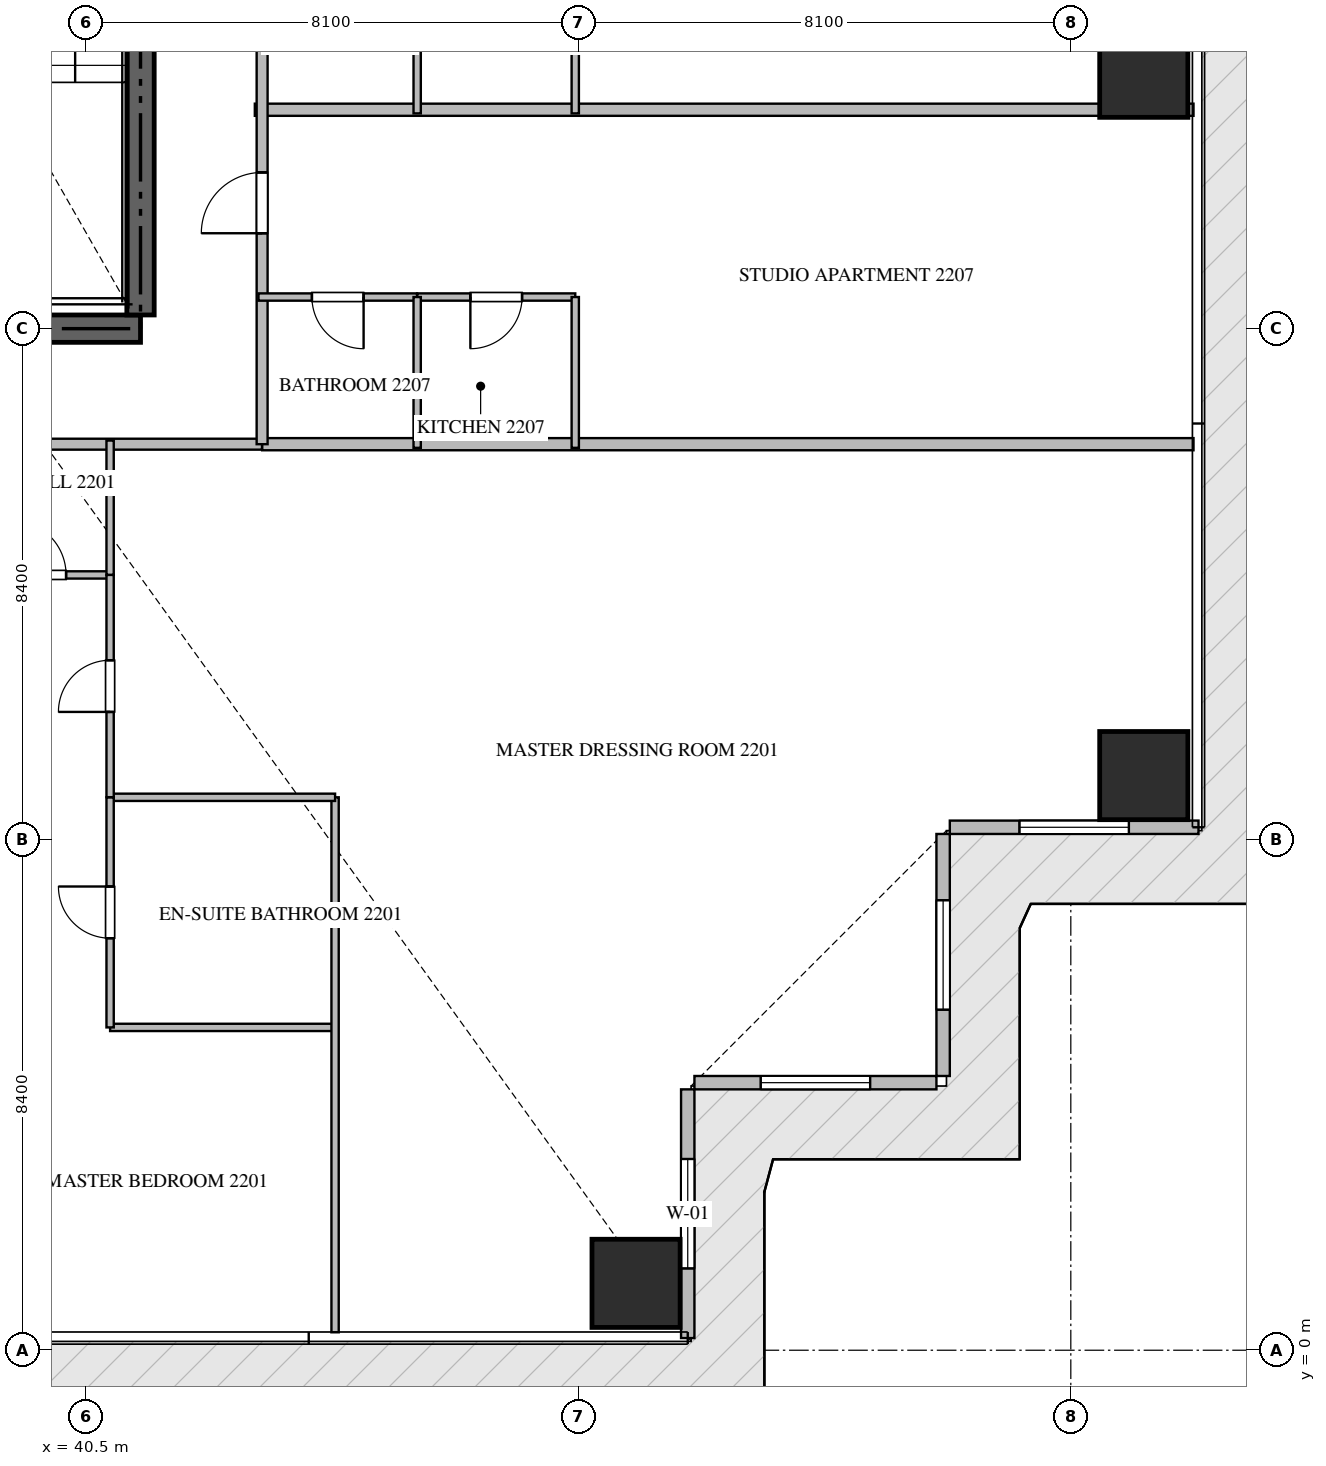
"""IFC4 building model, lengths in metres.
Left out: names, types, materials, properties, quantities, classifications, styles, units other than length and angle.
Written with IfcOpenShell. Run it as: python <this file> out.ifc"""

import sys

from ifc_helpers import new_model, si_unit, direction, frame, frame_2d, origin, origin_2d, place, context, subcontext, project, spatial, rectangle, extrude, source, transform, mapped, element, fill, save


model = new_model("IFC4")
c1 = context("Model", 3, precision=1e-05, world=origin(), true_north=direction((0.0, 1.0)))
c2 = subcontext(c1, "Body", "Model", "MODEL_VIEW")
j1 = project(units=[si_unit("LENGTHUNIT", "METRE"), si_unit("PLANEANGLEUNIT", "RADIAN")], contexts=[c1])
p1 = place(None, origin())
s1 = spatial("IfcSite", under=j1, at=p1, CompositionType="ELEMENT")
p2 = place(p1, origin())
s2 = spatial("IfcBuilding", under=s1, at=p2, CompositionType="ELEMENT")
p3 = place(p2, frame((0.0, 0.0, 90.45)))
s3 = spatial("IfcBuildingStorey", under=s2, at=p3, CompositionType="ELEMENT", Elevation=90.45)
p4 = place(p3, frame((23.4, 16.8, -0.26), z_axis=(0.0, 0.0, 1.0), x_axis=(1.0, 0.0, 0.0)))
e1 = element("IfcWall", 1, at=p4, inside=s3, PredefinedType="SHEAR", context=c2, shape_type="SweptSolid", body=[
    extrude(rectangle(XDim=18.0, YDim=0.45, at=frame_2d((9.0, 0.0))), origin(), (0.0, 0.0, 1.0), 3.748),
])
p5 = place(p3, frame((41.4, 17.025, -0.26), z_axis=(0.0, 0.0, 1.0), x_axis=(0.0, 1.0, 0.0)))
e2 = element("IfcWall", 2, at=p5, inside=s3, PredefinedType="SHEAR", context=c2, shape_type="SweptSolid", body=[
    extrude(rectangle(XDim=8.325, YDim=0.45, at=frame_2d((4.163, 0.0))), origin(), (0.0, 0.0, 1.0), 3.748),
])
m1 = source(origin(), c2, "Body", "SweptSolid", [
    extrude(rectangle(XDim=1.45, YDim=1.45, at=origin_2d()), origin(), (0.0, 0.0, 1.0), 3.75),
])
for number, where, z_axis, x_axis in (
    (3, (49.55, 1.1, -0.26), (0.0, 0.0, 1.0), (1.0, 0.0, 0.0)),
    (4, (57.9, 9.45, -0.26), (0.0, 0.0, 1.0), (1.0, 0.0, 0.0)),
    (5, (57.9, 21.0, -0.26), (0.0, 0.0, 1.0), (1.0, 0.0, 0.0)),
):
    element("IfcColumn", number, at=place(p3, frame(where, z_axis=z_axis, x_axis=x_axis)), inside=s3, PredefinedType="COLUMN", context=c2, shape_type="MappedRepresentation", body=[
        mapped(m1, transform((0.0, 0.0, 0.0), scale=1.0)),
    ])
p6 = place(p3, frame((50.4, 0.2, 0.0), z_axis=(0.0, 0.0, 1.0), x_axis=(0.0, 1.0, 0.0)))
e6 = element("IfcWall", 6, at=p6, inside=s3, PredefinedType="ELEMENTEDWALL", context=c2, shape_type="SweptSolid", body=[
    extrude(rectangle(XDim=4.09, YDim=0.22, at=frame_2d((2.045, 0.0))), origin(), (0.0, 0.0, 1.0), 3.475),
])
p7 = place(p6, frame((1.145, 0.0, 0.65)))
e7 = element("IfcOpeningElement", 7, at=p7, cuts=e6, PredefinedType="OPENING", context=c2, shape_type="SweptSolid", body=[
    extrude(rectangle(XDim=1.8, YDim=2.1, at=frame_2d((0.9, 1.05))), frame((0.0, 0.12, 0.0), z_axis=(0.0, -1.0, 0.0), x_axis=(1.0, 0.0, 0.0)), (0.0, 0.0, 1.0), 0.24),
])
p8 = place(p3, frame((50.51, 4.4, 0.0), z_axis=(0.0, 0.0, 1.0), x_axis=(1.0, 0.0, 0.0)))
e8 = element("IfcWall", 8, at=p8, inside=s3, PredefinedType="ELEMENTEDWALL", context=c2, shape_type="SweptSolid", body=[
    extrude(rectangle(XDim=3.98, YDim=0.22, at=frame_2d((1.99, 0.0))), origin(), (0.0, 0.0, 1.0), 3.475),
])
p9 = place(p8, frame((1.09, 0.0, 0.65)))
e9 = element("IfcOpeningElement", 9, at=p9, cuts=e8, PredefinedType="OPENING", context=c2, shape_type="SweptSolid", body=[
    extrude(rectangle(XDim=1.8, YDim=2.1, at=frame_2d((0.9, 1.05))), frame((0.0, 0.12, 0.0), z_axis=(0.0, -1.0, 0.0), x_axis=(1.0, 0.0, 0.0)), (0.0, 0.0, 1.0), 0.24),
])
p10 = place(p3, frame((54.6, 4.51, 0.0), z_axis=(0.0, 0.0, 1.0), x_axis=(0.0, 1.0, 0.0)))
e10 = element("IfcWall", 10, at=p10, inside=s3, PredefinedType="ELEMENTEDWALL", context=c2, shape_type="SweptSolid", body=[
    extrude(rectangle(XDim=3.98, YDim=0.22, at=frame_2d((1.99, 0.0))), origin(), (0.0, 0.0, 1.0), 3.475),
])
p11 = place(p10, frame((1.09, 0.0, 0.65)))
e11 = element("IfcOpeningElement", 11, at=p11, cuts=e10, PredefinedType="OPENING", context=c2, shape_type="SweptSolid", body=[
    extrude(rectangle(XDim=1.8, YDim=2.1, at=frame_2d((0.9, 1.05))), frame((0.0, 0.12, 0.0), z_axis=(0.0, -1.0, 0.0), x_axis=(1.0, 0.0, 0.0)), (0.0, 0.0, 1.0), 0.24),
])
p12 = place(p3, frame((54.71, 8.6, 0.0), z_axis=(0.0, 0.0, 1.0), x_axis=(1.0, 0.0, 0.0)))
e12 = element("IfcWall", 12, at=p12, inside=s3, PredefinedType="ELEMENTEDWALL", context=c2, shape_type="SweptSolid", body=[
    extrude(rectangle(XDim=4.09, YDim=0.22, at=frame_2d((2.045, 0.0))), origin(), (0.0, 0.0, 1.0), 3.475),
])
p13 = place(p12, frame((1.145, 0.0, 0.65)))
e13 = element("IfcOpeningElement", 13, at=p13, cuts=e12, PredefinedType="OPENING", context=c2, shape_type="SweptSolid", body=[
    extrude(rectangle(XDim=1.8, YDim=2.1, at=frame_2d((0.9, 1.05))), frame((0.0, 0.12, 0.0), z_axis=(0.0, -1.0, 0.0), x_axis=(1.0, 0.0, 0.0)), (0.0, 0.0, 1.0), 0.24),
])
p14 = place(p3, frame((43.28, 20.4, 0.0), z_axis=(0.0, 0.0, 1.0), x_axis=(1.0, 0.0, 0.0)))
e14 = element("IfcWall", 14, at=p14, inside=s3, PredefinedType="PARTITIONING", context=c2, shape_type="SweptSolid", body=[
    extrude(rectangle(XDim=15.438, YDim=0.2, at=frame_2d((7.719, 0.0))), origin(), (0.0, 0.0, 1.0), 3.49),
])
p15 = place(p3, frame((43.4, 14.9, 0.0), z_axis=(0.0, 0.0, 1.0), x_axis=(1.0, 0.0, 0.0)))
e15 = element("IfcWall", 15, at=p15, inside=s3, PredefinedType="PARTITIONING", context=c2, shape_type="SweptSolid", body=[
    extrude(rectangle(XDim=15.318, YDim=0.2, at=frame_2d((7.659, 0.0))), origin(), (0.0, 0.0, 1.0), 3.49),
])
p16 = place(p3, frame((21.402, 14.9, 0.0), z_axis=(0.0, 0.0, 1.0), x_axis=(1.0, 0.0, 0.0)))
e16 = element("IfcWall", 16, at=p16, inside=s3, PredefinedType="PARTITIONING", context=c2, shape_type="SweptSolid", body=[
    extrude(rectangle(XDim=21.996, YDim=0.18, at=frame_2d((10.998, 0.0))), origin(), (0.0, 0.0, 1.0), 3.49),
])
p17 = place(p16, frame((7.202, 0.0, 0.0)))
e17 = element("IfcOpeningElement", 17, at=p17, cuts=e16, PredefinedType="OPENING", context=c2, shape_type="SweptSolid", body=[
    extrude(rectangle(XDim=1.0, YDim=2.15, at=frame_2d((0.5, 1.075))), frame((0.0, 0.1, 0.0), z_axis=(0.0, -1.0, 0.0), x_axis=(1.0, 0.0, 0.0)), (0.0, 0.0, 1.0), 0.2),
])
p18 = place(p3, frame((43.4, 14.9, 0.0), z_axis=(0.0, 0.0, 1.0), x_axis=(0.0, 1.0, 0.0)))
e18 = element("IfcWall", 18, at=p18, inside=s3, PredefinedType="PARTITIONING", context=c2, shape_type="SweptSolid", body=[
    extrude(rectangle(XDim=20.6, YDim=0.18, at=frame_2d((10.3, 0.0))), origin(), (0.0, 0.0, 1.0), 3.49),
])
p19 = place(p18, frame((3.469, 0.0, 0.0)))
e19 = element("IfcOpeningElement", 19, at=p19, cuts=e18, PredefinedType="OPENING", context=c2, shape_type="SweptSolid", body=[
    extrude(rectangle(XDim=1.0, YDim=2.15, at=frame_2d((0.5, 1.075))), frame((0.0, 0.1, 0.0), z_axis=(0.0, -1.0, 0.0), x_axis=(1.0, 0.0, 0.0)), (0.0, 0.0, 1.0), 0.2),
])
p20 = place(p18, frame((11.074, 0.0, 0.0)))
e20 = element("IfcOpeningElement", 20, at=p20, cuts=e18, PredefinedType="OPENING", context=c2, shape_type="SweptSolid", body=[
    extrude(rectangle(XDim=1.0, YDim=2.15, at=frame_2d((0.5, 1.075))), frame((0.0, 0.1, 0.0), z_axis=(0.0, -1.0, 0.0), x_axis=(1.0, 0.0, 0.0)), (0.0, 0.0, 1.0), 0.2),
])
p21 = place(p18, frame((17.78, 0.0, 0.0)))
e21 = element("IfcOpeningElement", 21, at=p21, cuts=e18, PredefinedType="OPENING", context=c2, shape_type="SweptSolid", body=[
    extrude(rectangle(XDim=1.0, YDim=2.15, at=frame_2d((0.5, 1.075))), frame((0.0, 0.1, 0.0), z_axis=(0.0, -1.0, 0.0), x_axis=(1.0, 0.0, 0.0)), (0.0, 0.0, 1.0), 0.2),
])
p22 = place(p3, frame((38.552, 12.75, 0.0), z_axis=(0.0, 0.0, 1.0), x_axis=(1.0, 0.0, 0.0)))
e22 = element("IfcWall", 22, at=p22, inside=s3, PredefinedType="PARTITIONING", context=c2, shape_type="SweptSolid", body=[
    extrude(rectangle(XDim=2.348, YDim=0.12, at=frame_2d((1.174, 0.0))), origin(), (0.0, 0.0, 1.0), 3.49),
])
p23 = place(p22, frame((0.724, 0.0, 0.0)))
e23 = element("IfcOpeningElement", 23, at=p23, cuts=e22, PredefinedType="OPENING", context=c2, shape_type="SweptSolid", body=[
    extrude(rectangle(XDim=0.9, YDim=2.1, at=frame_2d((0.45, 1.05))), frame((0.0, 0.07, 0.0), z_axis=(0.0, -1.0, 0.0), x_axis=(1.0, 0.0, 0.0)), (0.0, 0.0, 1.0), 0.14),
])
p24 = place(p3, frame((40.9, 5.309, 0.0), z_axis=(0.0, 0.0, 1.0), x_axis=(1.0, 0.0, 0.0)))
e24 = element("IfcWall", 24, at=p24, inside=s3, PredefinedType="PARTITIONING", context=c2, shape_type="SweptSolid", body=[
    extrude(rectangle(XDim=3.7, YDim=0.12, at=frame_2d((1.85, 0.0))), origin(), (0.0, 0.0, 1.0), 3.49),
])
p25 = place(p3, frame((44.6, 0.295, 0.0), z_axis=(0.0, 0.0, 1.0), x_axis=(0.0, 1.0, 0.0)))
e25 = element("IfcWall", 25, at=p25, inside=s3, PredefinedType="PARTITIONING", context=c2, shape_type="SweptSolid", body=[
    extrude(rectangle(XDim=8.798, YDim=0.12, at=frame_2d((4.399, 0.0))), origin(), (0.0, 0.0, 1.0), 3.49),
])
p26 = place(p3, frame((40.9, 9.093, 0.0), z_axis=(0.0, 0.0, 1.0), x_axis=(1.0, 0.0, 0.0)))
e26 = element("IfcWall", 26, at=p26, inside=s3, PredefinedType="PARTITIONING", context=c2, shape_type="SweptSolid", body=[
    extrude(rectangle(XDim=3.7, YDim=0.12, at=frame_2d((1.85, 0.0))), origin(), (0.0, 0.0, 1.0), 3.49),
])
p27 = place(p3, frame((40.9, 5.309, 0.0), z_axis=(0.0, 0.0, 1.0), x_axis=(0.0, 1.0, 0.0)))
e27 = element("IfcWall", 27, at=p27, inside=s3, PredefinedType="PARTITIONING", context=c2, shape_type="SweptSolid", body=[
    extrude(rectangle(XDim=3.784, YDim=0.12, at=frame_2d((1.892, 0.0))), origin(), (0.0, 0.0, 1.0), 3.49),
])
p28 = place(p27, frame((1.467, 0.0, 0.0)))
e28 = element("IfcOpeningElement", 28, at=p28, cuts=e27, PredefinedType="OPENING", context=c2, shape_type="SweptSolid", body=[
    extrude(rectangle(XDim=0.85, YDim=2.1, at=frame_2d((0.425, 1.05))), frame((0.0, 0.07, 0.0), z_axis=(0.0, -1.0, 0.0), x_axis=(1.0, 0.0, 0.0)), (0.0, 0.0, 1.0), 0.14),
])
p29 = place(p3, frame((40.9, 9.095, 0.0), z_axis=(0.0, 0.0, 1.0), x_axis=(0.0, 1.0, 0.0)))
e29 = element("IfcWall", 29, at=p29, inside=s3, PredefinedType="PARTITIONING", context=c2, shape_type="SweptSolid", body=[
    extrude(rectangle(XDim=3.655, YDim=0.12, at=frame_2d((1.828, 0.0))), origin(), (0.0, 0.0, 1.0), 3.49),
])
p30 = place(p29, frame((1.402, 0.0, 0.0)))
e30 = element("IfcOpeningElement", 30, at=p30, cuts=e29, PredefinedType="OPENING", context=c2, shape_type="SweptSolid", body=[
    extrude(rectangle(XDim=0.85, YDim=2.1, at=frame_2d((0.425, 1.05))), frame((0.0, 0.07, 0.0), z_axis=(0.0, -1.0, 0.0), x_axis=(1.0, 0.0, 0.0)), (0.0, 0.0, 1.0), 0.14),
])
p31 = place(p3, frame((40.9, 12.752, 0.0), z_axis=(0.0, 0.0, 1.0), x_axis=(0.0, 1.0, 0.0)))
e31 = element("IfcWall", 31, at=p31, inside=s3, PredefinedType="PARTITIONING", context=c2, shape_type="SweptSolid", body=[
    extrude(rectangle(XDim=2.208, YDim=0.12, at=frame_2d((1.104, 0.0))), origin(), (0.0, 0.0, 1.0), 3.49),
])
p32 = place(p3, frame((48.55, 17.32, 0.0), z_axis=(0.0, 0.0, 1.0), x_axis=(-1.0, 0.0, 0.0)))
e32 = element("IfcWall", 32, at=p32, inside=s3, PredefinedType="PARTITIONING", context=c2, shape_type="SweptSolid", body=[
    extrude(rectangle(XDim=2.6, YDim=0.12, at=frame_2d((1.3, 0.0))), origin(), (0.0, 0.0, 1.0), 3.49),
])
p33 = place(p32, frame((0.875, 0.0, 0.0)))
e33 = element("IfcOpeningElement", 33, at=p33, cuts=e32, PredefinedType="OPENING", context=c2, shape_type="SweptSolid", body=[
    extrude(rectangle(XDim=0.85, YDim=2.1, at=frame_2d((0.425, 1.05))), frame((0.0, 0.07, 0.0), z_axis=(0.0, -1.0, 0.0), x_axis=(1.0, 0.0, 0.0)), (0.0, 0.0, 1.0), 0.14),
])
p34 = place(p3, frame((45.948, 17.32, 0.0), z_axis=(0.0, 0.0, 1.0), x_axis=(-1.0, 0.0, 0.0)))
e34 = element("IfcWall", 34, at=p34, inside=s3, PredefinedType="PARTITIONING", context=c2, shape_type="SweptSolid", body=[
    extrude(rectangle(XDim=2.608, YDim=0.12, at=frame_2d((1.304, 0.0))), origin(), (0.0, 0.0, 1.0), 3.49),
])
p35 = place(p34, frame((0.879, 0.0, 0.0)))
e35 = element("IfcOpeningElement", 35, at=p35, cuts=e34, PredefinedType="OPENING", context=c2, shape_type="SweptSolid", body=[
    extrude(rectangle(XDim=0.85, YDim=2.1, at=frame_2d((0.425, 1.05))), frame((0.0, 0.07, 0.0), z_axis=(0.0, -1.0, 0.0), x_axis=(1.0, 0.0, 0.0)), (0.0, 0.0, 1.0), 0.14),
])
for number, where, z_axis, x_axis in (
    (36, (45.95, 14.84, 0.0), (0.0, 0.0, 1.0), (0.0, 1.0, 0.0)),
    (37, (48.55, 14.84, 0.0), (0.0, 0.0, 1.0), (0.0, 1.0, 0.0)),
):
    element("IfcWall", number, at=place(p3, frame(where, z_axis=z_axis, x_axis=x_axis)), inside=s3, PredefinedType="PARTITIONING", context=c2, shape_type="SweptSolid", body=[
        extrude(rectangle(XDim=2.48, YDim=0.12, at=frame_2d((1.24, 0.0))), origin(), (0.0, 0.0, 1.0), 3.49),
    ])
for number, where, z_axis, x_axis in (
    (38, (45.95, 20.34, 0.0), (0.0, 0.0, 1.0), (0.0, 1.0, 0.0)),
    (39, (48.55, 20.34, 0.0), (0.0, 0.0, 1.0), (0.0, 1.0, 0.0)),
):
    element("IfcWall", number, at=place(p3, frame(where, z_axis=z_axis, x_axis=x_axis)), inside=s3, PredefinedType="PARTITIONING", context=c2, shape_type="SweptSolid", body=[
        extrude(rectangle(XDim=2.81, YDim=0.12, at=frame_2d((1.405, 0.0))), origin(), (0.0, 0.0, 1.0), 3.49),
    ])
m2 = source(origin(), c2, "Body", "SweptSolid", [
    extrude(rectangle(XDim=1.8, YDim=2.1, at=frame_2d((0.9, 1.05))), frame((0.0, 0.03, 0.0), z_axis=(0.0, -1.0, 0.0), x_axis=(1.0, 0.0, 0.0)), (0.0, 0.0, 1.0), 0.06),
])
p36 = place(p7, origin())
e40 = element("IfcWindow", 40, at=p36, inside=s3, PartitioningType="SINGLE_PANEL", PredefinedType="WINDOW", context=c2, shape_type="MappedRepresentation", body=[
    mapped(m2, transform((0.0, 0.0, 0.0), scale=1.0)),
])
fill(e7, e40)
p37 = place(p9, origin())
e41 = element("IfcWindow", 41, at=p37, inside=s3, PartitioningType="SINGLE_PANEL", PredefinedType="WINDOW", context=c2, shape_type="MappedRepresentation", body=[
    mapped(m2, transform((0.0, 0.0, 0.0), scale=1.0)),
])
fill(e9, e41)
p38 = place(p11, origin())
e42 = element("IfcWindow", 42, at=p38, inside=s3, PartitioningType="SINGLE_PANEL", PredefinedType="WINDOW", context=c2, shape_type="MappedRepresentation", body=[
    mapped(m2, transform((0.0, 0.0, 0.0), scale=1.0)),
])
fill(e11, e42)
p39 = place(p13, origin())
e43 = element("IfcWindow", 43, at=p39, inside=s3, PartitioningType="SINGLE_PANEL", PredefinedType="WINDOW", context=c2, shape_type="MappedRepresentation", body=[
    mapped(m2, transform((0.0, 0.0, 0.0), scale=1.0)),
])
fill(e13, e43)
m3 = source(origin(), c2, "Body", "SweptSolid", [
    extrude(rectangle(XDim=1.0, YDim=2.15, at=frame_2d((0.5, 1.075))), frame((0.0, 0.025, 0.0), z_axis=(0.0, -1.0, 0.0), x_axis=(1.0, 0.0, 0.0)), (0.0, 0.0, 1.0), 0.05),
])
p40 = place(p19, origin())
e44 = element("IfcDoor", 44, at=p40, inside=s3, OperationType="SINGLE_SWING_LEFT", PredefinedType="DOOR", context=c2, shape_type="MappedRepresentation", body=[
    mapped(m3, transform((0.0, 0.0, 0.0), scale=1.0)),
])
fill(e19, e44)
m4 = source(origin(), c2, "Body", "SweptSolid", [
    extrude(rectangle(XDim=0.9, YDim=2.1, at=frame_2d((0.45, 1.05))), frame((0.0, 0.025, 0.0), z_axis=(0.0, -1.0, 0.0), x_axis=(1.0, 0.0, 0.0)), (0.0, 0.0, 1.0), 0.05),
])
p41 = place(p23, origin())
e45 = element("IfcDoor", 45, at=p41, inside=s3, OperationType="SINGLE_SWING_LEFT", PredefinedType="DOOR", context=c2, shape_type="MappedRepresentation", body=[
    mapped(m4, transform((0.0, 0.0, 0.0), scale=1.0)),
])
fill(e23, e45)
m5 = source(origin(), c2, "Body", "SweptSolid", [
    extrude(rectangle(XDim=0.85, YDim=2.1, at=frame_2d((0.425, 1.05))), frame((0.0, 0.025, 0.0), z_axis=(0.0, -1.0, 0.0), x_axis=(1.0, 0.0, 0.0)), (0.0, 0.0, 1.0), 0.05),
])
p42 = place(p28, origin())
e46 = element("IfcDoor", 46, at=p42, inside=s3, OperationType="SINGLE_SWING_RIGHT", PredefinedType="DOOR", context=c2, shape_type="MappedRepresentation", body=[
    mapped(m5, transform((0.0, 0.0, 0.0), scale=1.0)),
])
fill(e28, e46)
p43 = place(p30, origin())
e47 = element("IfcDoor", 47, at=p43, inside=s3, OperationType="SINGLE_SWING_LEFT", PredefinedType="DOOR", context=c2, shape_type="MappedRepresentation", body=[
    mapped(m5, transform((0.0, 0.0, 0.0), scale=1.0)),
])
fill(e30, e47)
p44 = place(p33, origin())
e48 = element("IfcDoor", 48, at=p44, inside=s3, OperationType="SINGLE_SWING_RIGHT", PredefinedType="DOOR", context=c2, shape_type="MappedRepresentation", body=[
    mapped(m5, transform((0.0, 0.0, 0.0), scale=1.0)),
])
fill(e33, e48)
p45 = place(p35, origin())
e49 = element("IfcDoor", 49, at=p45, inside=s3, OperationType="SINGLE_SWING_LEFT", PredefinedType="DOOR", context=c2, shape_type="MappedRepresentation", body=[
    mapped(m5, transform((0.0, 0.0, 0.0), scale=1.0)),
])
fill(e35, e49)
save(model, sys.argv[1])
